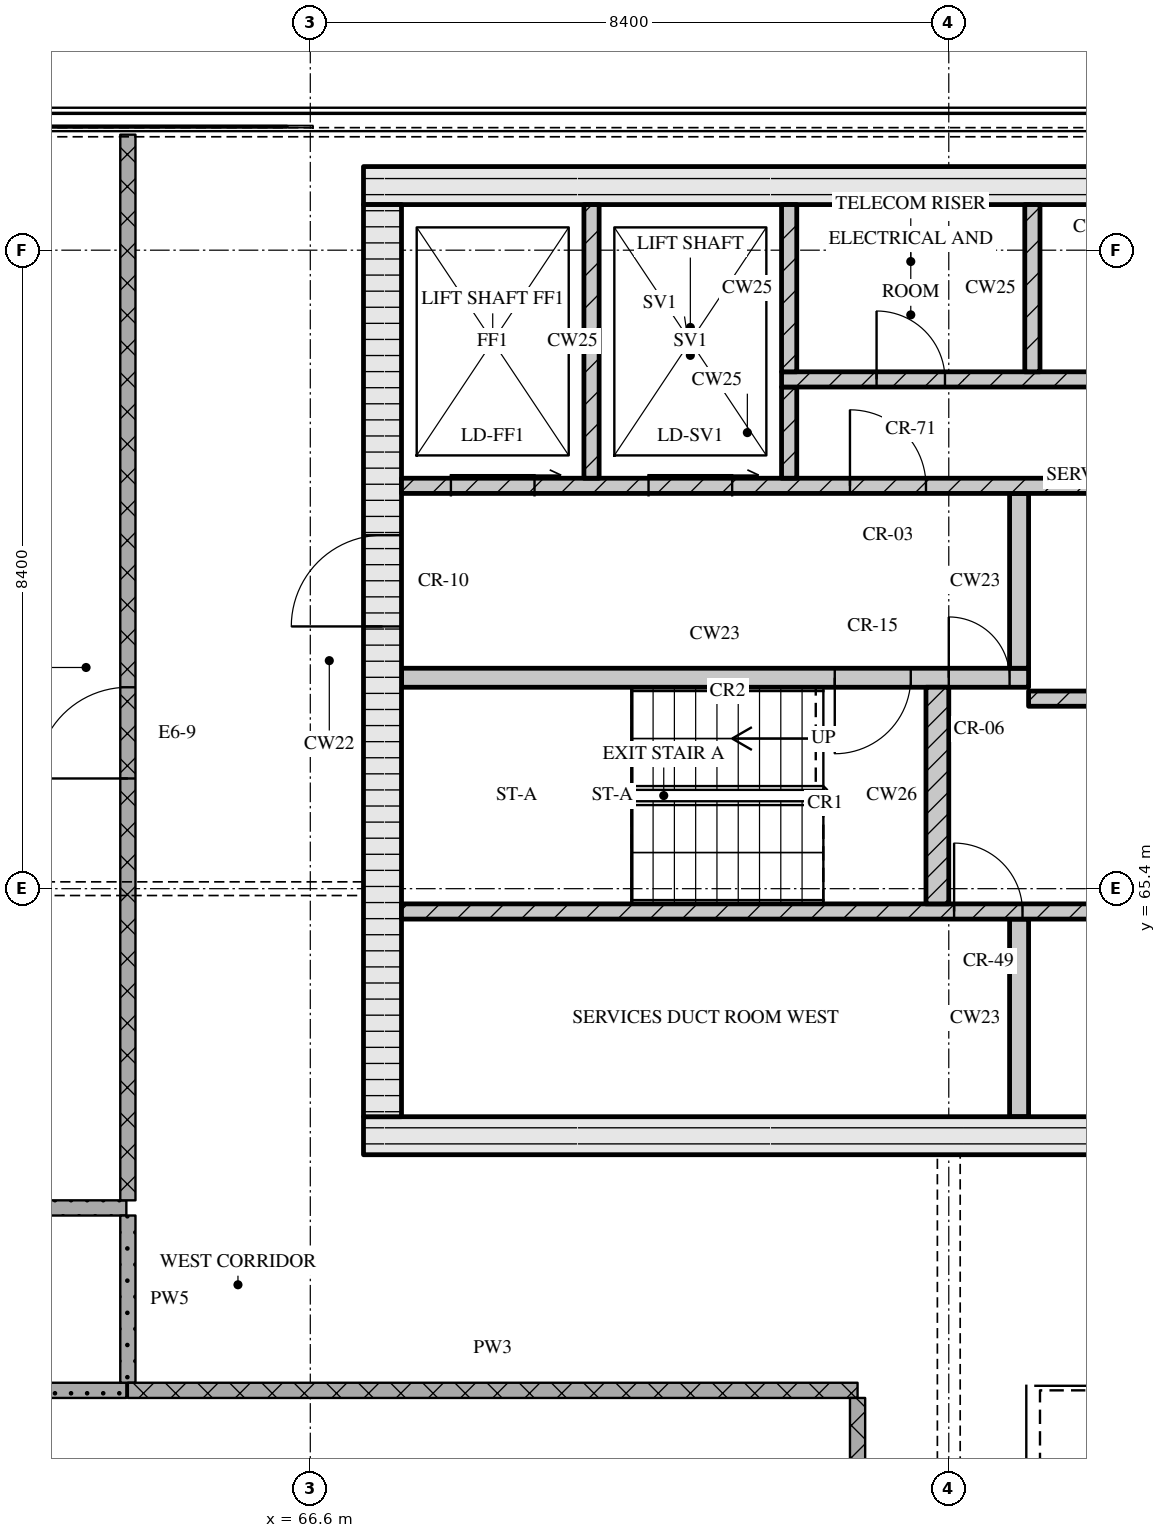
"""IFC4 building model, lengths in metres.
Left out: names, types, materials, properties, quantities, classifications, styles, units other than length and angle.
Written with IfcOpenShell. Run it as: python <this file> out.ifc"""

import sys

from ifc_helpers import new_model, si_unit, direction, frame, frame_2d, origin, place, context, subcontext, project, spatial, rectangle, extrude, element, fill, save


model = new_model("IFC4")
c1 = context("Model", 3, precision=1e-05, world=origin(), true_north=direction((0.0, 1.0)))
c2 = subcontext(c1, "Body", "Model", "MODEL_VIEW")
j1 = project(units=[si_unit("LENGTHUNIT", "METRE"), si_unit("PLANEANGLEUNIT", "RADIAN")], contexts=[c1])
p1 = place(None, origin())
s1 = spatial("IfcSite", under=j1, at=p1, CompositionType="ELEMENT")
p2 = place(p1, origin())
s2 = spatial("IfcBuilding", under=s1, at=p2, CompositionType="ELEMENT")
p3 = place(p2, frame((0.0, 0.0, 299.55)))
s3 = spatial("IfcBuildingStorey", under=s2, at=p3, CompositionType="ELEMENT", Elevation=299.55)
p4 = place(p3, frame((67.3, 62.15, 0.0), z_axis=(0.0, 0.0, 1.0), x_axis=(1.0, 0.0, 0.0)))
e1 = element("IfcWall", 1, at=p4, inside=s3, PredefinedType="SOLIDWALL", context=c2, shape_type="SweptSolid", body=[
    extrude(rectangle(XDim=40.6, YDim=0.5, at=frame_2d((20.3, 0.0))), origin(), (0.0, 0.0, 1.0), 3.32),
])
p5 = place(p4, frame((20.65, 0.0, 0.0)))
e2 = element("IfcOpeningElement", 2, at=p5, cuts=e1, PredefinedType="OPENING", context=c2, shape_type="SweptSolid", body=[
    extrude(rectangle(XDim=1.8, YDim=2.1, at=frame_2d((0.9, 1.05))), frame((0.0, 0.26, 0.0), z_axis=(0.0, -1.0, 0.0), x_axis=(1.0, 0.0, 0.0)), (0.0, 0.0, 1.0), 0.52),
])
p6 = place(p3, frame((67.3, 74.65, 0.0), z_axis=(0.0, 0.0, 1.0), x_axis=(1.0, 0.0, 0.0)))
e3 = element("IfcWall", 3, at=p6, inside=s3, PredefinedType="SOLIDWALL", context=c2, shape_type="SweptSolid", body=[
    extrude(rectangle(XDim=40.6, YDim=0.5, at=frame_2d((20.3, 0.0))), origin(), (0.0, 0.0, 1.0), 3.32),
])
p7 = place(p3, frame((67.55, 62.4, 0.0), z_axis=(0.0, 0.0, 1.0), x_axis=(0.0, 1.0, 0.0)))
e4 = element("IfcWall", 4, at=p7, inside=s3, PredefinedType="SOLIDWALL", context=c2, shape_type="SweptSolid", body=[
    extrude(rectangle(XDim=12.0, YDim=0.5, at=frame_2d((6.0, 0.0))), origin(), (0.0, 0.0, 1.0), 3.32),
])
p8 = place(p7, frame((6.45, 0.0, 0.0)))
e5 = element("IfcOpeningElement", 5, at=p8, cuts=e4, PredefinedType="OPENING", context=c2, shape_type="SweptSolid", body=[
    extrude(rectangle(XDim=1.2, YDim=2.1, at=frame_2d((0.6, 1.05))), frame((0.0, 0.26, 0.0), z_axis=(0.0, -1.0, 0.0), x_axis=(1.0, 0.0, 0.0)), (0.0, 0.0, 1.0), 0.52),
])
p9 = place(p3, frame((75.925, 62.4, 0.0), z_axis=(0.0, 0.0, 1.0), x_axis=(0.0, 1.0, 0.0)))
e6 = element("IfcWall", 6, at=p9, inside=s3, PredefinedType="SOLIDWALL", context=c2, shape_type="SweptSolid", body=[
    extrude(rectangle(XDim=2.6, YDim=0.25, at=frame_2d((1.3, 0.0))), origin(), (0.0, 0.0, 1.0), 3.32),
])
p10 = place(p3, frame((67.8, 65.1, 0.0), z_axis=(0.0, 0.0, 1.0), x_axis=(1.0, 0.0, 0.0)))
e7 = element("IfcWall", 7, at=p10, inside=s3, PredefinedType="SOLIDWALL", context=c2, shape_type="SweptSolid", body=[
    extrude(rectangle(XDim=18.5, YDim=0.2, at=frame_2d((9.25, 0.0))), origin(), (0.0, 0.0, 1.0), 3.32),
])
p11 = place(p10, frame((7.27, 0.0, 0.0)))
e8 = element("IfcOpeningElement", 8, at=p11, cuts=e7, PredefinedType="OPENING", context=c2, shape_type="SweptSolid", body=[
    extrude(rectangle(XDim=0.9, YDim=2.1, at=frame_2d((0.45, 1.05))), frame((0.0, 0.11, 0.0), z_axis=(0.0, -1.0, 0.0), x_axis=(1.0, 0.0, 0.0)), (0.0, 0.0, 1.0), 0.22),
])
p12 = place(p10, frame((11.45, 0.0, 0.0)))
e9 = element("IfcOpeningElement", 9, at=p12, cuts=e7, PredefinedType="OPENING", context=c2, shape_type="SweptSolid", body=[
    extrude(rectangle(XDim=0.9, YDim=2.1, at=frame_2d((0.45, 1.05))), frame((0.0, 0.11, 0.0), z_axis=(0.0, -1.0, 0.0), x_axis=(1.0, 0.0, 0.0)), (0.0, 0.0, 1.0), 0.22),
])
p13 = place(p10, frame((16.7, 0.0, 0.0)))
e10 = element("IfcOpeningElement", 10, at=p13, cuts=e7, PredefinedType="OPENING", context=c2, shape_type="SweptSolid", body=[
    extrude(rectangle(XDim=0.9, YDim=2.1, at=frame_2d((0.45, 1.05))), frame((0.0, 0.11, 0.0), z_axis=(0.0, -1.0, 0.0), x_axis=(1.0, 0.0, 0.0)), (0.0, 0.0, 1.0), 0.22),
])
p14 = place(p3, frame((74.85, 65.2, 0.0), z_axis=(0.0, 0.0, 1.0), x_axis=(0.0, 1.0, 0.0)))
e11 = element("IfcWall", 11, at=p14, inside=s3, PredefinedType="SOLIDWALL", context=c2, shape_type="SweptSolid", body=[
    extrude(rectangle(XDim=2.85, YDim=0.3, at=frame_2d((1.425, 0.0))), origin(), (0.0, 0.0, 1.0), 3.32),
])
p15 = place(p3, frame((76.05, 67.9, 0.0), z_axis=(0.0, 0.0, 1.0), x_axis=(1.0, 0.0, 0.0)))
e12 = element("IfcWall", 12, at=p15, inside=s3, PredefinedType="SOLIDWALL", context=c2, shape_type="SweptSolid", body=[
    extrude(rectangle(XDim=23.1, YDim=0.2, at=frame_2d((11.55, 0.0))), origin(), (0.0, 0.0, 1.0), 3.32),
])
p16 = place(p15, frame((1.4, 0.0, 0.0)))
e13 = element("IfcOpeningElement", 13, at=p16, cuts=e12, PredefinedType="OPENING", context=c2, shape_type="SweptSolid", body=[
    extrude(rectangle(XDim=0.9, YDim=2.1, at=frame_2d((0.45, 1.05))), frame((0.0, 0.11, 0.0), z_axis=(0.0, -1.0, 0.0), x_axis=(1.0, 0.0, 0.0)), (0.0, 0.0, 1.0), 0.22),
])
p17 = place(p15, frame((5.11, 0.0, 0.0)))
e14 = element("IfcOpeningElement", 14, at=p17, cuts=e12, PredefinedType="OPENING", context=c2, shape_type="SweptSolid", body=[
    extrude(rectangle(XDim=0.9, YDim=2.1, at=frame_2d((0.45, 1.05))), frame((0.0, 0.11, 0.0), z_axis=(0.0, -1.0, 0.0), x_axis=(1.0, 0.0, 0.0)), (0.0, 0.0, 1.0), 0.22),
])
p18 = place(p15, frame((8.45, 0.0, 0.0)))
e15 = element("IfcOpeningElement", 15, at=p18, cuts=e12, PredefinedType="OPENING", context=c2, shape_type="SweptSolid", body=[
    extrude(rectangle(XDim=0.9, YDim=2.1, at=frame_2d((0.45, 1.05))), frame((0.0, 0.11, 0.0), z_axis=(0.0, -1.0, 0.0), x_axis=(1.0, 0.0, 0.0)), (0.0, 0.0, 1.0), 0.22),
])
p19 = place(p15, frame((10.91, 0.0, 0.0)))
e16 = element("IfcOpeningElement", 16, at=p19, cuts=e12, PredefinedType="OPENING", context=c2, shape_type="SweptSolid", body=[
    extrude(rectangle(XDim=0.9, YDim=2.1, at=frame_2d((0.45, 1.05))), frame((0.0, 0.11, 0.0), z_axis=(0.0, -1.0, 0.0), x_axis=(1.0, 0.0, 0.0)), (0.0, 0.0, 1.0), 0.22),
])
p20 = place(p15, frame((13.55, 0.0, 0.0)))
e17 = element("IfcOpeningElement", 17, at=p20, cuts=e12, PredefinedType="OPENING", context=c2, shape_type="SweptSolid", body=[
    extrude(rectangle(XDim=1.0, YDim=2.1, at=frame_2d((0.5, 1.05))), frame((0.0, 0.11, 0.0), z_axis=(0.0, -1.0, 0.0), x_axis=(1.0, 0.0, 0.0)), (0.0, 0.0, 1.0), 0.22),
])
p21 = place(p15, frame((16.2, 0.0, 0.0)))
e18 = element("IfcOpeningElement", 18, at=p21, cuts=e12, PredefinedType="OPENING", context=c2, shape_type="SweptSolid", body=[
    extrude(rectangle(XDim=1.1, YDim=2.1, at=frame_2d((0.55, 1.05))), frame((0.0, 0.11, 0.0), z_axis=(0.0, -1.0, 0.0), x_axis=(1.0, 0.0, 0.0)), (0.0, 0.0, 1.0), 0.22),
])
p22 = place(p15, frame((18.7, 0.0, 0.0)))
e19 = element("IfcOpeningElement", 19, at=p22, cuts=e12, PredefinedType="OPENING", context=c2, shape_type="SweptSolid", body=[
    extrude(rectangle(XDim=1.1, YDim=2.1, at=frame_2d((0.55, 1.05))), frame((0.0, 0.11, 0.0), z_axis=(0.0, -1.0, 0.0), x_axis=(1.0, 0.0, 0.0)), (0.0, 0.0, 1.0), 0.22),
])
p23 = place(p15, frame((21.2, 0.0, 0.0)))
e20 = element("IfcOpeningElement", 20, at=p23, cuts=e12, PredefinedType="OPENING", context=c2, shape_type="SweptSolid", body=[
    extrude(rectangle(XDim=1.1, YDim=2.1, at=frame_2d((0.55, 1.05))), frame((0.0, 0.11, 0.0), z_axis=(0.0, -1.0, 0.0), x_axis=(1.0, 0.0, 0.0)), (0.0, 0.0, 1.0), 0.22),
])
p24 = place(p3, frame((67.8, 68.175, 0.0), z_axis=(0.0, 0.0, 1.0), x_axis=(1.0, 0.0, 0.0)))
e21 = element("IfcWall", 21, at=p24, inside=s3, PredefinedType="SOLIDWALL", context=c2, shape_type="SweptSolid", body=[
    extrude(rectangle(XDim=8.25, YDim=0.25, at=frame_2d((4.125, 0.0))), origin(), (0.0, 0.0, 1.0), 3.32),
])
p25 = place(p24, frame((5.7, 0.0, 0.0)))
e22 = element("IfcOpeningElement", 22, at=p25, cuts=e21, PredefinedType="OPENING", context=c2, shape_type="SweptSolid", body=[
    extrude(rectangle(XDim=1.0, YDim=2.1, at=frame_2d((0.5, 1.05))), frame((0.0, 0.135, 0.0), z_axis=(0.0, -1.0, 0.0), x_axis=(1.0, 0.0, 0.0)), (0.0, 0.0, 1.0), 0.27),
])
p26 = place(p24, frame((7.2, 0.0, 0.0)))
e23 = element("IfcOpeningElement", 23, at=p26, cuts=e21, PredefinedType="OPENING", context=c2, shape_type="SweptSolid", body=[
    extrude(rectangle(XDim=0.8, YDim=2.1, at=frame_2d((0.4, 1.05))), frame((0.0, 0.135, 0.0), z_axis=(0.0, -1.0, 0.0), x_axis=(1.0, 0.0, 0.0)), (0.0, 0.0, 1.0), 0.27),
])
p27 = place(p3, frame((75.925, 68.3, 0.0), z_axis=(0.0, 0.0, 1.0), x_axis=(0.0, 1.0, 0.0)))
e24 = element("IfcWall", 24, at=p27, inside=s3, PredefinedType="SOLIDWALL", context=c2, shape_type="SweptSolid", body=[
    extrude(rectangle(XDim=2.3, YDim=0.25, at=frame_2d((1.15, 0.0))), origin(), (0.0, 0.0, 1.0), 3.32),
])
p28 = place(p3, frame((67.8, 70.7, 0.0), z_axis=(0.0, 0.0, 1.0), x_axis=(1.0, 0.0, 0.0)))
e25 = element("IfcWall", 25, at=p28, inside=s3, PredefinedType="SOLIDWALL", context=c2, shape_type="SweptSolid", body=[
    extrude(rectangle(XDim=39.6, YDim=0.2, at=frame_2d((19.8, 0.0))), origin(), (0.0, 0.0, 1.0), 3.32),
])
p29 = place(p28, frame((0.65, 0.0, 0.0)))
e26 = element("IfcOpeningElement", 26, at=p29, cuts=e25, PredefinedType="OPENING", context=c2, shape_type="SweptSolid", body=[
    extrude(rectangle(XDim=1.1, YDim=2.1, at=frame_2d((0.55, 1.05))), frame((0.0, 0.11, 0.0), z_axis=(0.0, -1.0, 0.0), x_axis=(1.0, 0.0, 0.0)), (0.0, 0.0, 1.0), 0.22),
])
p30 = place(p28, frame((3.25, 0.0, 0.0)))
e27 = element("IfcOpeningElement", 27, at=p30, cuts=e25, PredefinedType="OPENING", context=c2, shape_type="SweptSolid", body=[
    extrude(rectangle(XDim=1.1, YDim=2.1, at=frame_2d((0.55, 1.05))), frame((0.0, 0.11, 0.0), z_axis=(0.0, -1.0, 0.0), x_axis=(1.0, 0.0, 0.0)), (0.0, 0.0, 1.0), 0.22),
])
p31 = place(p28, frame((5.9, 0.0, 0.0)))
e28 = element("IfcOpeningElement", 28, at=p31, cuts=e25, PredefinedType="OPENING", context=c2, shape_type="SweptSolid", body=[
    extrude(rectangle(XDim=1.0, YDim=2.1, at=frame_2d((0.5, 1.05))), frame((0.0, 0.11, 0.0), z_axis=(0.0, -1.0, 0.0), x_axis=(1.0, 0.0, 0.0)), (0.0, 0.0, 1.0), 0.22),
])
p32 = place(p28, frame((21.7, 0.0, 0.0)))
e29 = element("IfcOpeningElement", 29, at=p32, cuts=e25, PredefinedType="OPENING", context=c2, shape_type="SweptSolid", body=[
    extrude(rectangle(XDim=1.0, YDim=2.1, at=frame_2d((0.5, 1.05))), frame((0.0, 0.11, 0.0), z_axis=(0.0, -1.0, 0.0), x_axis=(1.0, 0.0, 0.0)), (0.0, 0.0, 1.0), 0.22),
])
p33 = place(p28, frame((32.7, 0.0, 0.0)))
e30 = element("IfcOpeningElement", 30, at=p33, cuts=e25, PredefinedType="OPENING", context=c2, shape_type="SweptSolid", body=[
    extrude(rectangle(XDim=1.0, YDim=2.1, at=frame_2d((0.5, 1.05))), frame((0.0, 0.11, 0.0), z_axis=(0.0, -1.0, 0.0), x_axis=(1.0, 0.0, 0.0)), (0.0, 0.0, 1.0), 0.22),
])
p34 = place(p28, frame((35.25, 0.0, 0.0)))
e31 = element("IfcOpeningElement", 31, at=p34, cuts=e25, PredefinedType="OPENING", context=c2, shape_type="SweptSolid", body=[
    extrude(rectangle(XDim=1.1, YDim=2.1, at=frame_2d((0.55, 1.05))), frame((0.0, 0.11, 0.0), z_axis=(0.0, -1.0, 0.0), x_axis=(1.0, 0.0, 0.0)), (0.0, 0.0, 1.0), 0.22),
])
p35 = place(p28, frame((37.85, 0.0, 0.0)))
e32 = element("IfcOpeningElement", 32, at=p35, cuts=e25, PredefinedType="OPENING", context=c2, shape_type="SweptSolid", body=[
    extrude(rectangle(XDim=1.1, YDim=2.1, at=frame_2d((0.55, 1.05))), frame((0.0, 0.11, 0.0), z_axis=(0.0, -1.0, 0.0), x_axis=(1.0, 0.0, 0.0)), (0.0, 0.0, 1.0), 0.22),
])
p36 = place(p3, frame((70.3, 70.8, 0.0), z_axis=(0.0, 0.0, 1.0), x_axis=(0.0, 1.0, 0.0)))
e33 = element("IfcWall", 33, at=p36, inside=s3, PredefinedType="SOLIDWALL", context=c2, shape_type="SweptSolid", body=[
    extrude(rectangle(XDim=3.6, YDim=0.2, at=frame_2d((1.8, 0.0))), origin(), (0.0, 0.0, 1.0), 3.32),
])
p37 = place(p3, frame((72.9, 70.8, 0.0), z_axis=(0.0, 0.0, 1.0), x_axis=(0.0, 1.0, 0.0)))
e34 = element("IfcWall", 34, at=p37, inside=s3, PredefinedType="SOLIDWALL", context=c2, shape_type="SweptSolid", body=[
    extrude(rectangle(XDim=1.2, YDim=0.2, at=frame_2d((0.6, 0.0))), origin(), (0.0, 0.0, 1.0), 3.32),
])
p38 = place(p3, frame((72.8, 72.1, 0.0), z_axis=(0.0, 0.0, 1.0), x_axis=(1.0, 0.0, 0.0)))
e35 = element("IfcWall", 35, at=p38, inside=s3, PredefinedType="SOLIDWALL", context=c2, shape_type="SweptSolid", body=[
    extrude(rectangle(XDim=8.92, YDim=0.2, at=frame_2d((4.46, 0.0))), origin(), (0.0, 0.0, 1.0), 3.32),
])
p39 = place(p38, frame((1.25, 0.0, 0.0)))
e36 = element("IfcOpeningElement", 36, at=p39, cuts=e35, PredefinedType="OPENING", context=c2, shape_type="SweptSolid", body=[
    extrude(rectangle(XDim=0.9, YDim=2.1, at=frame_2d((0.45, 1.05))), frame((0.0, 0.11, 0.0), z_axis=(0.0, -1.0, 0.0), x_axis=(1.0, 0.0, 0.0)), (0.0, 0.0, 1.0), 0.22),
])
p40 = place(p38, frame((4.45, 0.0, 0.0)))
e37 = element("IfcOpeningElement", 37, at=p40, cuts=e35, PredefinedType="OPENING", context=c2, shape_type="SweptSolid", body=[
    extrude(rectangle(XDim=0.9, YDim=2.1, at=frame_2d((0.45, 1.05))), frame((0.0, 0.11, 0.0), z_axis=(0.0, -1.0, 0.0), x_axis=(1.0, 0.0, 0.0)), (0.0, 0.0, 1.0), 0.22),
])
p41 = place(p38, frame((7.21, 0.0, 0.0)))
e38 = element("IfcOpeningElement", 38, at=p41, cuts=e35, PredefinedType="OPENING", context=c2, shape_type="SweptSolid", body=[
    extrude(rectangle(XDim=0.9, YDim=2.1, at=frame_2d((0.45, 1.05))), frame((0.0, 0.11, 0.0), z_axis=(0.0, -1.0, 0.0), x_axis=(1.0, 0.0, 0.0)), (0.0, 0.0, 1.0), 0.22),
])
for number, where, z_axis, x_axis in (
    (39, (72.9, 72.2, 0.0), (0.0, 0.0, 1.0), (0.0, 1.0, 0.0)),
    (40, (76.1, 72.2, 0.0), (0.0, 0.0, 1.0), (0.0, 1.0, 0.0)),
):
    element("IfcWall", number, at=place(p3, frame(where, z_axis=z_axis, x_axis=x_axis)), inside=s3, PredefinedType="SOLIDWALL", context=c2, shape_type="SweptSolid", body=[
        extrude(rectangle(XDim=2.2, YDim=0.2, at=frame_2d((1.1, 0.0))), origin(), (0.0, 0.0, 1.0), 3.32),
    ])
p42 = place(p3, frame((64.2, 58.8, 0.0), z_axis=(0.0, 0.0, 1.0), x_axis=(1.0, 0.0, 0.0)))
e41 = element("IfcWall", 41, at=p42, inside=s3, PredefinedType="PARTITIONING", context=c2, shape_type="SweptSolid", body=[
    extrude(rectangle(XDim=9.6, YDim=0.2, at=frame_2d((4.8, 0.0))), origin(), (0.0, 0.0, 1.0), 3.32),
])
for number, where, z_axis, x_axis in (
    (42, (56.7, 58.8, 0.0), (0.0, 0.0, 1.0), (1.0, 0.0, 0.0)),
    (43, (56.7, 61.2, 0.0), (0.0, 0.0, 1.0), (1.0, 0.0, 0.0)),
):
    element("IfcWall", number, at=place(p3, frame(where, z_axis=z_axis, x_axis=x_axis)), inside=s3, PredefinedType="PARTITIONING", context=c2, shape_type="SweptSolid", body=[
        extrude(rectangle(XDim=7.48, YDim=0.2, at=frame_2d((3.74, 0.0))), origin(), (0.0, 0.0, 1.0), 3.32),
    ])
p43 = place(p3, frame((64.2, 61.3, 0.0), z_axis=(0.0, 0.0, 1.0), x_axis=(0.0, 1.0, 0.0)))
e44 = element("IfcWall", 44, at=p43, inside=s3, PredefinedType="PARTITIONING", context=c2, shape_type="SweptSolid", body=[
    extrude(rectangle(XDim=14.02, YDim=0.2, at=frame_2d((7.01, 0.0))), origin(), (0.0, 0.0, 1.0), 3.32),
])
p44 = place(p43, frame((5.55, 0.0, 0.0)))
e45 = element("IfcOpeningElement", 45, at=p44, cuts=e44, PredefinedType="OPENING", context=c2, shape_type="SweptSolid", body=[
    extrude(rectangle(XDim=1.2, YDim=2.1, at=frame_2d((0.6, 1.05))), frame((0.0, 0.11, 0.0), z_axis=(0.0, -1.0, 0.0), x_axis=(1.0, 0.0, 0.0)), (0.0, 0.0, 1.0), 0.22),
])
p45 = place(p3, frame((64.2, 61.1, 0.0), z_axis=(0.0, 0.0, 1.0), x_axis=(0.0, -1.0, 0.0)))
e46 = element("IfcWall", 46, at=p45, inside=s3, PredefinedType="PARTITIONING", context=c2, shape_type="SweptSolid", body=[
    extrude(rectangle(XDim=2.2, YDim=0.2, at=frame_2d((1.1, 0.0))), origin(), (0.0, 0.0, 1.0), 3.32),
])
p46 = place(p3, frame((73.8, 50.7, 0.0), z_axis=(0.0, 0.0, 1.0), x_axis=(0.0, 1.0, 0.0)))
e47 = element("IfcWall", 47, at=p46, inside=s3, PredefinedType="PARTITIONING", context=c2, shape_type="SweptSolid", body=[
    extrude(rectangle(XDim=8.0, YDim=0.2, at=frame_2d((4.0, 0.0))), origin(), (0.0, 0.0, 1.0), 3.32),
])
p47 = place(p46, frame((4.35, 0.0, 0.0)))
e48 = element("IfcOpeningElement", 48, at=p47, cuts=e47, PredefinedType="OPENING", context=c2, shape_type="SweptSolid", body=[
    extrude(rectangle(XDim=1.2, YDim=2.1, at=frame_2d((0.6, 1.05))), frame((0.0, 0.11, 0.0), z_axis=(0.0, -1.0, 0.0), x_axis=(1.0, 0.0, 0.0)), (0.0, 0.0, 1.0), 0.22),
])
p48 = place(p11, origin())
e49 = element("IfcDoor", 49, at=p48, inside=s3, OperationType="SINGLE_SWING_LEFT", PredefinedType="DOOR", context=c2, shape_type="SweptSolid", body=[
    extrude(rectangle(XDim=0.9, YDim=2.1, at=frame_2d((0.45, 1.05))), frame((0.0, 0.025, 0.0), z_axis=(0.0, -1.0, 0.0), x_axis=(1.0, 0.0, 0.0)), (0.0, 0.0, 1.0), 0.05),
])
fill(e8, e49)
p49 = place(p25, origin())
e50 = element("IfcDoor", 50, at=p49, inside=s3, OperationType="SINGLE_SWING_RIGHT", PredefinedType="DOOR", context=c2, shape_type="SweptSolid", body=[
    extrude(rectangle(XDim=1.0, YDim=2.1, at=frame_2d((0.5, 1.05))), frame((0.0, 0.025, 0.0), z_axis=(0.0, -1.0, 0.0), x_axis=(1.0, 0.0, 0.0)), (0.0, 0.0, 1.0), 0.05),
])
fill(e22, e50)
p50 = place(p26, origin())
e51 = element("IfcDoor", 51, at=p50, inside=s3, OperationType="SINGLE_SWING_LEFT", PredefinedType="DOOR", context=c2, shape_type="SweptSolid", body=[
    extrude(rectangle(XDim=0.8, YDim=2.1, at=frame_2d((0.4, 1.05))), frame((0.0, 0.025, 0.0), z_axis=(0.0, -1.0, 0.0), x_axis=(1.0, 0.0, 0.0)), (0.0, 0.0, 1.0), 0.05),
])
fill(e23, e51)
p51 = place(p8, origin())
e52 = element("IfcDoor", 52, at=p51, inside=s3, OperationType="SINGLE_SWING_LEFT", PredefinedType="DOOR", context=c2, shape_type="SweptSolid", body=[
    extrude(rectangle(XDim=1.2, YDim=2.1, at=frame_2d((0.6, 1.05))), frame((0.0, 0.025, 0.0), z_axis=(0.0, -1.0, 0.0), x_axis=(1.0, 0.0, 0.0)), (0.0, 0.0, 1.0), 0.05),
])
fill(e5, e52)
p52 = place(p29, origin())
e53 = element("IfcDoor", 53, at=p52, inside=s3, OperationType="SLIDING_TO_RIGHT", PredefinedType="DOOR", context=c2, shape_type="SweptSolid", body=[
    extrude(rectangle(XDim=1.1, YDim=2.1, at=frame_2d((0.55, 1.05))), frame((0.0, 0.025, 0.0), z_axis=(0.0, -1.0, 0.0), x_axis=(1.0, 0.0, 0.0)), (0.0, 0.0, 1.0), 0.05),
])
fill(e26, e53)
p53 = place(p30, origin())
e54 = element("IfcDoor", 54, at=p53, inside=s3, OperationType="SLIDING_TO_RIGHT", PredefinedType="DOOR", context=c2, shape_type="SweptSolid", body=[
    extrude(rectangle(XDim=1.1, YDim=2.1, at=frame_2d((0.55, 1.05))), frame((0.0, 0.025, 0.0), z_axis=(0.0, -1.0, 0.0), x_axis=(1.0, 0.0, 0.0)), (0.0, 0.0, 1.0), 0.05),
])
fill(e27, e54)
p54 = place(p31, origin())
e55 = element("IfcDoor", 55, at=p54, inside=s3, OperationType="SINGLE_SWING_LEFT", PredefinedType="DOOR", context=c2, shape_type="SweptSolid", body=[
    extrude(rectangle(XDim=1.0, YDim=2.1, at=frame_2d((0.5, 1.05))), frame((0.0, 0.025, 0.0), z_axis=(0.0, -1.0, 0.0), x_axis=(1.0, 0.0, 0.0)), (0.0, 0.0, 1.0), 0.05),
])
fill(e28, e55)
p55 = place(p39, origin())
e56 = element("IfcDoor", 56, at=p55, inside=s3, OperationType="SINGLE_SWING_LEFT", PredefinedType="DOOR", context=c2, shape_type="SweptSolid", body=[
    extrude(rectangle(XDim=0.9, YDim=2.1, at=frame_2d((0.45, 1.05))), frame((0.0, 0.025, 0.0), z_axis=(0.0, -1.0, 0.0), x_axis=(1.0, 0.0, 0.0)), (0.0, 0.0, 1.0), 0.05),
])
fill(e36, e56)
p56 = place(p44, origin())
e57 = element("IfcDoor", 57, at=p56, inside=s3, OperationType="SINGLE_SWING_LEFT", PredefinedType="DOOR", context=c2, shape_type="SweptSolid", body=[
    extrude(rectangle(XDim=1.2, YDim=2.1, at=frame_2d((0.6, 1.05))), frame((0.0, 0.025, 0.0), z_axis=(0.0, -1.0, 0.0), x_axis=(1.0, 0.0, 0.0)), (0.0, 0.0, 1.0), 0.05),
])
fill(e45, e57)
save(model, sys.argv[1])
